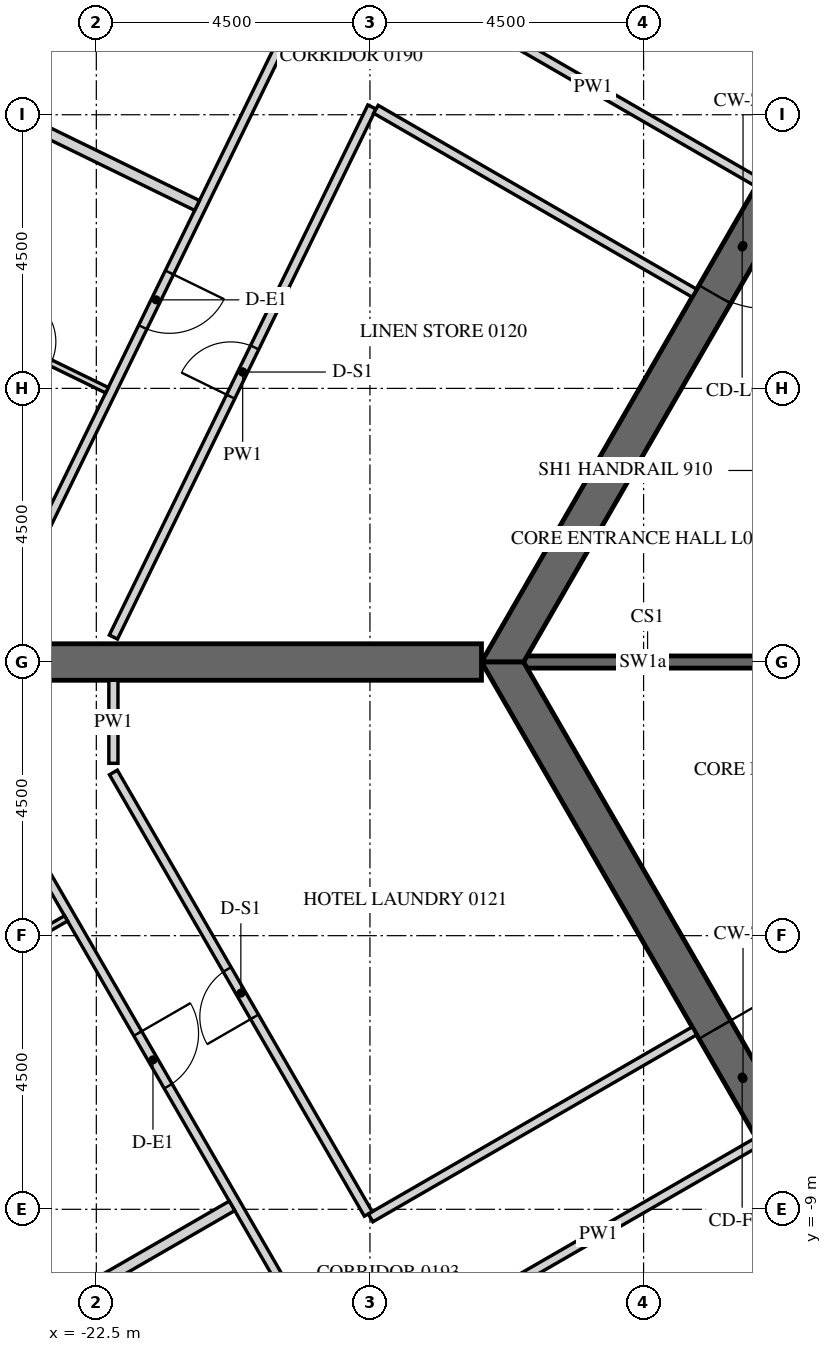
"""IFC4 building model, lengths in metres.
Left out: names, types, materials, properties, quantities, classifications, styles, units other than length and angle.
Written with IfcOpenShell. Run it as: python <this file> out.ifc"""

import sys

from ifc_helpers import new_model, si_unit, direction, frame, frame_2d, origin, place, context, subcontext, project, spatial, polyline, rectangle, outline, extrude, element, fill, save


model = new_model("IFC4")
c1 = context("Model", 3, precision=1e-05, world=origin(), true_north=direction((0.0, 1.0)))
c2 = subcontext(c1, "Body", "Model", "MODEL_VIEW")
j1 = project(units=[si_unit("LENGTHUNIT", "METRE"), si_unit("PLANEANGLEUNIT", "RADIAN")], contexts=[c1])
p1 = place(None, origin())
s1 = spatial("IfcSite", under=j1, at=p1, CompositionType="ELEMENT")
p2 = place(p1, origin())
s2 = spatial("IfcBuilding", under=s1, at=p2, CompositionType="ELEMENT")
p3 = place(p2, frame((0.0, 0.0, 37.5)))
s3 = spatial("IfcBuildingStorey", under=s2, at=p3, CompositionType="ELEMENT", Elevation=37.5)
p4 = place(p3, frame((-19.595, 27.633, -0.15), z_axis=(0.0, 0.0, 1.0), x_axis=(-0.438368285794, -0.898795441694, 0.0)))
e1 = element("IfcWall", 1, at=p4, inside=s3, PredefinedType="SOLIDWALL", context=c2, shape_type="SweptSolid", body=[
    extrude(outline(polyline([(-0.026, -0.275), (30.093, -0.275), (30.048, 0.275), (0.026, 0.275), (-0.026, -0.275)])), origin(), (0.0, 0.0, 1.0), 3.9),
])
p5 = place(p4, frame((1.236, 0.0, 1.05)))
e2 = element("IfcOpeningElement", 2, at=p5, cuts=e1, PredefinedType="OPENING", context=c2, shape_type="SweptSolid", body=[
    extrude(rectangle(XDim=2.4, YDim=2.4, at=frame_2d((1.2, 1.2))), frame((0.0, 0.285, 0.0), z_axis=(0.0, -1.0, 0.0), x_axis=(1.0, 0.0, 0.0)), (0.0, 0.0, 1.0), 0.57),
])
p6 = place(p4, frame((4.835, 0.0, 1.05)))
e3 = element("IfcOpeningElement", 3, at=p6, cuts=e1, PredefinedType="OPENING", context=c2, shape_type="SweptSolid", body=[
    extrude(rectangle(XDim=2.4, YDim=2.4, at=frame_2d((1.2, 1.2))), frame((0.0, 0.285, 0.0), z_axis=(0.0, -1.0, 0.0), x_axis=(1.0, 0.0, 0.0)), (0.0, 0.0, 1.0), 0.57),
])
p7 = place(p4, frame((8.436, 0.0, 1.05)))
e4 = element("IfcOpeningElement", 4, at=p7, cuts=e1, PredefinedType="OPENING", context=c2, shape_type="SweptSolid", body=[
    extrude(rectangle(XDim=2.4, YDim=2.4, at=frame_2d((1.2, 1.2))), frame((0.0, 0.285, 0.0), z_axis=(0.0, -1.0, 0.0), x_axis=(1.0, 0.0, 0.0)), (0.0, 0.0, 1.0), 0.57),
])
p8 = place(p4, frame((12.035, 0.0, 1.05)))
e5 = element("IfcOpeningElement", 5, at=p8, cuts=e1, PredefinedType="OPENING", context=c2, shape_type="SweptSolid", body=[
    extrude(rectangle(XDim=2.4, YDim=2.4, at=frame_2d((1.2, 1.2))), frame((0.0, 0.285, 0.0), z_axis=(0.0, -1.0, 0.0), x_axis=(1.0, 0.0, 0.0)), (0.0, 0.0, 1.0), 0.57),
])
p9 = place(p4, frame((15.635, 0.0, 1.05)))
e6 = element("IfcOpeningElement", 6, at=p9, cuts=e1, PredefinedType="OPENING", context=c2, shape_type="SweptSolid", body=[
    extrude(rectangle(XDim=2.4, YDim=2.4, at=frame_2d((1.2, 1.2))), frame((0.0, 0.285, 0.0), z_axis=(0.0, -1.0, 0.0), x_axis=(1.0, 0.0, 0.0)), (0.0, 0.0, 1.0), 0.57),
])
p10 = place(p4, frame((19.236, 0.0, 1.05)))
e7 = element("IfcOpeningElement", 7, at=p10, cuts=e1, PredefinedType="OPENING", context=c2, shape_type="SweptSolid", body=[
    extrude(rectangle(XDim=2.4, YDim=2.4, at=frame_2d((1.2, 1.2))), frame((0.0, 0.285, 0.0), z_axis=(0.0, -1.0, 0.0), x_axis=(1.0, 0.0, 0.0)), (0.0, 0.0, 1.0), 0.57),
])
p11 = place(p4, frame((22.835, 0.0, 1.05)))
e8 = element("IfcOpeningElement", 8, at=p11, cuts=e1, PredefinedType="OPENING", context=c2, shape_type="SweptSolid", body=[
    extrude(rectangle(XDim=2.4, YDim=2.4, at=frame_2d((1.2, 1.2))), frame((0.0, 0.285, 0.0), z_axis=(0.0, -1.0, 0.0), x_axis=(1.0, 0.0, 0.0)), (0.0, 0.0, 1.0), 0.57),
])
p12 = place(p4, frame((26.436, 0.0, 1.05)))
e9 = element("IfcOpeningElement", 9, at=p12, cuts=e1, PredefinedType="OPENING", context=c2, shape_type="SweptSolid", body=[
    extrude(rectangle(XDim=2.4, YDim=2.4, at=frame_2d((1.2, 1.2))), frame((0.0, 0.285, 0.0), z_axis=(0.0, -1.0, 0.0), x_axis=(1.0, 0.0, 0.0)), (0.0, 0.0, 1.0), 0.57),
])
p13 = place(p3, frame((-32.655, -2.89, -0.15), z_axis=(0.0, 0.0, 1.0), x_axis=(0.499997711317, -0.866026725152, 0.0)))
e10 = element("IfcWall", 10, at=p13, inside=s3, PredefinedType="SOLIDWALL", context=c2, shape_type="SweptSolid", body=[
    extrude(outline(polyline([(-0.022, -0.275), (30.097, -0.275), (30.045, 0.275), (0.022, 0.275), (-0.022, -0.275)])), origin(), (0.0, 0.0, 1.0), 3.9),
])
p14 = place(p13, frame((1.236, 0.0, 1.05)))
e11 = element("IfcOpeningElement", 11, at=p14, cuts=e10, PredefinedType="OPENING", context=c2, shape_type="SweptSolid", body=[
    extrude(rectangle(XDim=2.4, YDim=2.4, at=frame_2d((1.2, 1.2))), frame((0.0, 0.285, 0.0), z_axis=(0.0, -1.0, 0.0), x_axis=(1.0, 0.0, 0.0)), (0.0, 0.0, 1.0), 0.57),
])
p15 = place(p13, frame((4.835, 0.0, 1.05)))
e12 = element("IfcOpeningElement", 12, at=p15, cuts=e10, PredefinedType="OPENING", context=c2, shape_type="SweptSolid", body=[
    extrude(rectangle(XDim=2.4, YDim=2.4, at=frame_2d((1.2, 1.2))), frame((0.0, 0.285, 0.0), z_axis=(0.0, -1.0, 0.0), x_axis=(1.0, 0.0, 0.0)), (0.0, 0.0, 1.0), 0.57),
])
p16 = place(p13, frame((8.436, 0.0, 1.05)))
e13 = element("IfcOpeningElement", 13, at=p16, cuts=e10, PredefinedType="OPENING", context=c2, shape_type="SweptSolid", body=[
    extrude(rectangle(XDim=2.4, YDim=2.4, at=frame_2d((1.2, 1.2))), frame((0.0, 0.285, 0.0), z_axis=(0.0, -1.0, 0.0), x_axis=(1.0, 0.0, 0.0)), (0.0, 0.0, 1.0), 0.57),
])
p17 = place(p13, frame((12.035, 0.0, 1.05)))
e14 = element("IfcOpeningElement", 14, at=p17, cuts=e10, PredefinedType="OPENING", context=c2, shape_type="SweptSolid", body=[
    extrude(rectangle(XDim=2.4, YDim=2.4, at=frame_2d((1.2, 1.2))), frame((0.0, 0.285, 0.0), z_axis=(0.0, -1.0, 0.0), x_axis=(1.0, 0.0, 0.0)), (0.0, 0.0, 1.0), 0.57),
])
p18 = place(p13, frame((15.635, 0.0, 1.05)))
e15 = element("IfcOpeningElement", 15, at=p18, cuts=e10, PredefinedType="OPENING", context=c2, shape_type="SweptSolid", body=[
    extrude(rectangle(XDim=2.4, YDim=2.4, at=frame_2d((1.2, 1.2))), frame((0.0, 0.285, 0.0), z_axis=(0.0, -1.0, 0.0), x_axis=(1.0, 0.0, 0.0)), (0.0, 0.0, 1.0), 0.57),
])
p19 = place(p13, frame((19.236, 0.0, 1.05)))
e16 = element("IfcOpeningElement", 16, at=p19, cuts=e10, PredefinedType="OPENING", context=c2, shape_type="SweptSolid", body=[
    extrude(rectangle(XDim=2.4, YDim=2.4, at=frame_2d((1.2, 1.2))), frame((0.0, 0.285, 0.0), z_axis=(0.0, -1.0, 0.0), x_axis=(1.0, 0.0, 0.0)), (0.0, 0.0, 1.0), 0.57),
])
p20 = place(p13, frame((22.835, 0.0, 1.05)))
e17 = element("IfcOpeningElement", 17, at=p20, cuts=e10, PredefinedType="OPENING", context=c2, shape_type="SweptSolid", body=[
    extrude(rectangle(XDim=2.4, YDim=2.4, at=frame_2d((1.2, 1.2))), frame((0.0, 0.285, 0.0), z_axis=(0.0, -1.0, 0.0), x_axis=(1.0, 0.0, 0.0)), (0.0, 0.0, 1.0), 0.57),
])
p21 = place(p13, frame((26.436, 0.0, 1.05)))
e18 = element("IfcOpeningElement", 18, at=p21, cuts=e10, PredefinedType="OPENING", context=c2, shape_type="SweptSolid", body=[
    extrude(rectangle(XDim=2.4, YDim=2.4, at=frame_2d((1.2, 1.2))), frame((0.0, 0.285, 0.0), z_axis=(0.0, -1.0, 0.0), x_axis=(1.0, 0.0, 0.0)), (0.0, 0.0, 1.0), 0.57),
])
p22 = place(p3, frame((-7.91, 13.7, -0.15), z_axis=(0.0, 0.0, 1.0), x_axis=(-0.499999880136, -0.866025472988, 0.0)))
e19 = element("IfcWall", 19, at=p22, inside=s3, PredefinedType="SHEAR", context=c2, shape_type="SweptSolid", body=[
    extrude(outline(polyline([(-0.173, -0.3), (15.993, -0.3), (15.646, 0.3), (0.173, 0.3), (-0.173, -0.3)])), origin(), (0.0, 0.0, 1.0), 3.9),
])
p23 = place(p22, frame((7.039, 0.0, 0.15)))
e20 = element("IfcOpeningElement", 20, at=p23, cuts=e19, PredefinedType="OPENING", context=c2, shape_type="SweptSolid", body=[
    extrude(rectangle(XDim=1.8, YDim=2.4, at=frame_2d((0.9, 1.2))), frame((0.0, 0.31, 0.0), z_axis=(0.0, -1.0, 0.0), x_axis=(1.0, 0.0, 0.0)), (0.0, 0.0, 1.0), 0.62),
])
p24 = place(p3, frame((-15.819, 0.0, -0.15), z_axis=(0.0, 0.0, 1.0), x_axis=(0.499999880136, -0.866025472988, 0.0)))
e21 = element("IfcWall", 21, at=p24, inside=s3, PredefinedType="SHEAR", context=c2, shape_type="SweptSolid", body=[
    extrude(outline(polyline([(-0.173, -0.3), (15.993, -0.3), (15.646, 0.3), (0.173, 0.3), (-0.173, -0.3)])), origin(), (0.0, 0.0, 1.0), 3.9),
])
p25 = place(p24, frame((6.981, 0.0, 0.15)))
e22 = element("IfcOpeningElement", 22, at=p25, cuts=e21, PredefinedType="OPENING", context=c2, shape_type="SweptSolid", body=[
    extrude(rectangle(XDim=1.8, YDim=2.4, at=frame_2d((0.9, 1.2))), frame((0.0, 0.31, 0.0), z_axis=(0.0, -1.0, 0.0), x_axis=(1.0, 0.0, 0.0)), (0.0, 0.0, 1.0), 0.62),
])
p26 = place(p3, frame((-16.166, 0.0, -0.15), z_axis=(0.0, 0.0, 1.0), x_axis=(-1.0, 0.0, 0.0)))
e23 = element("IfcWall", 23, at=p26, inside=s3, PredefinedType="SHEAR", context=c2, shape_type="SweptSolid", body=[
    extrude(rectangle(XDim=16.509, YDim=0.6, at=frame_2d((8.254, 0.0))), origin(), (0.0, 0.0, 1.0), 3.9),
])
p27 = place(p26, frame((7.354, 0.0, 0.15)))
e24 = element("IfcOpeningElement", 24, at=p27, cuts=e23, PredefinedType="OPENING", context=c2, shape_type="SweptSolid", body=[
    extrude(rectangle(XDim=1.8, YDim=2.4, at=frame_2d((0.9, 1.2))), frame((0.0, 0.31, 0.0), z_axis=(0.0, -1.0, 0.0), x_axis=(1.0, 0.0, 0.0)), (0.0, 0.0, 1.0), 0.62),
])
p28 = place(p3, frame((-11.547, 0.0, -0.15), z_axis=(0.0, 0.0, 1.0), x_axis=(-1.0, 0.0, 0.0)))
e25 = element("IfcWall", 25, at=p28, inside=s3, PredefinedType="SHEAR", context=c2, shape_type="SweptSolid", body=[
    extrude(rectangle(XDim=3.926, YDim=0.2, at=frame_2d((1.963, 0.0))), origin(), (0.0, 0.0, 1.0), 3.9),
])
p29 = place(p3, frame((-13.752, 21.875, 0.0), z_axis=(0.0, 0.0, 1.0), x_axis=(-0.438374473378, -0.898792423806, 0.0)))
e26 = element("IfcWall", 26, at=p29, inside=s3, PredefinedType="PARTITIONING", context=c2, shape_type="SweptSolid", body=[
    extrude(rectangle(XDim=21.918, YDim=0.15, at=frame_2d((10.959, 0.0))), origin(), (0.0, 0.0, 1.0), 2.988),
])
p30 = place(p29, frame((9.521, 0.0, 0.0)))
e27 = element("IfcOpeningElement", 27, at=p30, cuts=e26, PredefinedType="OPENING", context=c2, shape_type="SweptSolid", body=[
    extrude(rectangle(XDim=1.0, YDim=2.1, at=frame_2d((0.5, 1.05))), frame((0.0, 0.085, 0.0), z_axis=(0.0, -1.0, 0.0), x_axis=(1.0, 0.0, 0.0)), (0.0, 0.0, 1.0), 0.17),
])
p31 = place(p29, frame((17.211, 0.0, 0.0)))
e28 = element("IfcOpeningElement", 28, at=p31, cuts=e26, PredefinedType="OPENING", context=c2, shape_type="SweptSolid", body=[
    extrude(rectangle(XDim=1.0, YDim=2.1, at=frame_2d((0.5, 1.05))), frame((0.0, 0.085, 0.0), z_axis=(0.0, -1.0, 0.0), x_axis=(1.0, 0.0, 0.0)), (0.0, 0.0, 1.0), 0.17),
])
p32 = place(p3, frame((-11.614, 7.884, 0.0), z_axis=(0.0, 0.0, 1.0), x_axis=(-0.866025438137, 0.4999999405, 0.0)))
e29 = element("IfcWall", 29, at=p32, inside=s3, PredefinedType="PARTITIONING", context=c2, shape_type="SweptSolid", body=[
    extrude(rectangle(XDim=6.271, YDim=0.15, at=frame_2d((3.135, 0.0))), origin(), (0.0, 0.0, 1.0), 2.988),
])
p33 = place(p3, frame((-22.219, 0.41, 0.0), z_axis=(0.0, 0.0, 1.0), x_axis=(0.438391891827, 0.898783927972, 0.0)))
e30 = element("IfcWall", 30, at=p33, inside=s3, PredefinedType="PARTITIONING", context=c2, shape_type="SweptSolid", body=[
    extrude(rectangle(XDim=9.699, YDim=0.15, at=frame_2d((4.85, 0.0))), origin(), (0.0, 0.0, 1.0), 2.988),
])
p34 = place(p33, frame((4.4, 0.0, 0.0)))
e31 = element("IfcOpeningElement", 31, at=p34, cuts=e30, PredefinedType="OPENING", context=c2, shape_type="SweptSolid", body=[
    extrude(rectangle(XDim=0.9, YDim=2.1, at=frame_2d((0.45, 1.05))), frame((0.0, 0.085, 0.0), z_axis=(0.0, -1.0, 0.0), x_axis=(1.0, 0.0, 0.0)), (0.0, 0.0, 1.0), 0.17),
])
p35 = place(p3, frame((-17.902, 9.09, 0.0), z_axis=(0.0, 0.0, 1.0), x_axis=(0.866036368755, -0.499981007633, 0.0)))
e32 = element("IfcWall", 32, at=p35, inside=s3, PredefinedType="PARTITIONING", context=c2, shape_type="SweptSolid", body=[
    extrude(rectangle(XDim=6.049, YDim=0.15, at=frame_2d((3.024, 0.0))), origin(), (0.0, 0.0, 1.0), 2.988),
])
p36 = place(p3, frame((-24.09, -2.175, 0.0), z_axis=(0.0, 0.0, 1.0), x_axis=(0.499996832073, -0.86602723278, 0.0)))
e33 = element("IfcWall", 33, at=p36, inside=s3, PredefinedType="PARTITIONING", context=c2, shape_type="SweptSolid", body=[
    extrude(rectangle(XDim=23.877, YDim=0.15, at=frame_2d((11.938, 0.0))), origin(), (0.0, 0.0, 1.0), 2.988),
])
p37 = place(p36, frame((4.543, 0.0, 0.0)))
e34 = element("IfcOpeningElement", 34, at=p37, cuts=e33, PredefinedType="OPENING", context=c2, shape_type="SweptSolid", body=[
    extrude(rectangle(XDim=1.0, YDim=2.1, at=frame_2d((0.5, 1.05))), frame((0.0, 0.085, 0.0), z_axis=(0.0, -1.0, 0.0), x_axis=(1.0, 0.0, 0.0)), (0.0, 0.0, 1.0), 0.17),
])
p38 = place(p36, frame((11.372, 0.0, 0.0)))
e35 = element("IfcOpeningElement", 35, at=p38, cuts=e33, PredefinedType="OPENING", context=c2, shape_type="SweptSolid", body=[
    extrude(rectangle(XDim=1.0, YDim=2.1, at=frame_2d((0.5, 1.05))), frame((0.0, 0.085, 0.0), z_axis=(0.0, -1.0, 0.0), x_axis=(1.0, 0.0, 0.0)), (0.0, 0.0, 1.0), 0.17),
])
p39 = place(p36, frame((19.425, 0.0, 0.0)))
e36 = element("IfcOpeningElement", 36, at=p39, cuts=e33, PredefinedType="OPENING", context=c2, shape_type="SweptSolid", body=[
    extrude(rectangle(XDim=1.0, YDim=2.1, at=frame_2d((0.5, 1.05))), frame((0.0, 0.085, 0.0), z_axis=(0.0, -1.0, 0.0), x_axis=(1.0, 0.0, 0.0)), (0.0, 0.0, 1.0), 0.17),
])
p40 = place(p3, frame((-12.664, -6.066, 0.0), z_axis=(0.0, 0.0, 1.0), x_axis=(-0.866023618125, -0.500003092839, 0.0)))
e37 = element("IfcWall", 37, at=p40, inside=s3, PredefinedType="PARTITIONING", context=c2, shape_type="SweptSolid", body=[
    extrude(rectangle(XDim=6.15, YDim=0.15, at=frame_2d((3.075, 0.0))), origin(), (0.0, 0.0, 1.0), 2.988),
])
p41 = place(p3, frame((-18.027, -9.076, 0.0), z_axis=(0.0, 0.0, 1.0), x_axis=(-0.500007318041, 0.86602117867, 0.0)))
e38 = element("IfcWall", 38, at=p41, inside=s3, PredefinedType="PARTITIONING", context=c2, shape_type="SweptSolid", body=[
    extrude(rectangle(XDim=8.383, YDim=0.15, at=frame_2d((4.191, 0.0))), origin(), (0.0, 0.0, 1.0), 2.988),
])
p42 = place(p41, frame((3.742, 0.0, 0.0)))
e39 = element("IfcOpeningElement", 39, at=p42, cuts=e38, PredefinedType="OPENING", context=c2, shape_type="SweptSolid", body=[
    extrude(rectangle(XDim=0.9, YDim=2.1, at=frame_2d((0.45, 1.05))), frame((0.0, 0.085, 0.0), z_axis=(0.0, -1.0, 0.0), x_axis=(1.0, 0.0, 0.0)), (0.0, 0.0, 1.0), 0.17),
])
p43 = place(p3, frame((-22.219, -1.666, 0.0), z_axis=(0.0, 0.0, 1.0), x_axis=(0.0, 1.0, 0.0)))
e40 = element("IfcWall", 40, at=p43, inside=s3, PredefinedType="PARTITIONING", context=c2, shape_type="SweptSolid", body=[
    extrude(rectangle(XDim=1.366, YDim=0.15, at=frame_2d((0.683, 0.0))), origin(), (0.0, 0.0, 1.0), 2.988),
])
p44 = place(p3, frame((-16.875, -10.922, 0.0), z_axis=(0.0, 0.0, 1.0), x_axis=(0.866023634079, 0.500003065207, 0.0)))
e41 = element("IfcWall", 41, at=p44, inside=s3, PredefinedType="PARTITIONING", context=c2, shape_type="SweptSolid", body=[
    extrude(rectangle(XDim=6.075, YDim=0.15, at=frame_2d((3.038, 0.0))), origin(), (0.0, 0.0, 1.0), 2.988),
])
p45 = place(p3, frame((-21.416, 15.743, 0.0), z_axis=(0.0, 0.0, 1.0), x_axis=(-0.438380708798, -0.898789382533, 0.0)))
e42 = element("IfcWall", 42, at=p45, inside=s3, PredefinedType="PARTITIONING", context=c2, shape_type="SweptSolid", body=[
    extrude(rectangle(XDim=7.06, YDim=0.1, at=frame_2d((3.53, 0.0))), origin(), (0.0, 0.0, 1.0), 2.988),
])
p46 = place(p45, frame((3.1, 0.0, 0.0)))
e43 = element("IfcOpeningElement", 43, at=p46, cuts=e42, PredefinedType="OPENING", context=c2, shape_type="SweptSolid", body=[
    extrude(rectangle(XDim=0.9, YDim=2.1, at=frame_2d((0.45, 1.05))), frame((0.0, 0.06, 0.0), z_axis=(0.0, -1.0, 0.0), x_axis=(1.0, 0.0, 0.0)), (0.0, 0.0, 1.0), 0.12),
])
p47 = place(p3, frame((-27.517, 10.763, 0.0), z_axis=(0.0, 0.0, 1.0), x_axis=(0.898789933843, -0.438379578473, 0.0)))
e44 = element("IfcWall", 44, at=p47, inside=s3, PredefinedType="PARTITIONING", context=c2, shape_type="SweptSolid", body=[
    extrude(rectangle(XDim=7.425, YDim=0.18, at=frame_2d((3.712, 0.0))), origin(), (0.0, 0.0, 1.0), 2.988),
])
p48 = place(p3, frame((-24.909, 5.73, 0.0), z_axis=(0.0, 0.0, 1.0), x_axis=(0.898799457159, -0.438360052708, 0.0)))
e45 = element("IfcWall", 45, at=p48, inside=s3, PredefinedType="PARTITIONING", context=c2, shape_type="SweptSolid", body=[
    extrude(rectangle(XDim=2.875, YDim=0.1, at=frame_2d((1.438, 0.0))), origin(), (0.0, 0.0, 1.0), 2.988),
])
p49 = place(p48, frame((1.05, 0.0, 0.0)))
e46 = element("IfcOpeningElement", 46, at=p49, cuts=e45, PredefinedType="OPENING", context=c2, shape_type="SweptSolid", body=[
    extrude(rectangle(XDim=0.8, YDim=2.1, at=frame_2d((0.4, 1.05))), frame((0.0, 0.06, 0.0), z_axis=(0.0, -1.0, 0.0), x_axis=(1.0, 0.0, 0.0)), (0.0, 0.0, 1.0), 0.12),
])
p50 = place(p3, frame((-22.998, -4.216, 0.0), z_axis=(0.0, 0.0, 1.0), x_axis=(-0.866025730634, -0.499999433879, 0.0)))
e47 = element("IfcWall", 47, at=p50, inside=s3, PredefinedType="PARTITIONING", context=c2, shape_type="SweptSolid", body=[
    extrude(rectangle(XDim=2.925, YDim=0.1, at=frame_2d((1.462, 0.0))), origin(), (0.0, 0.0, 1.0), 2.988),
])
p51 = place(p50, frame((1.025, 0.0, 0.0)))
e48 = element("IfcOpeningElement", 48, at=p51, cuts=e47, PredefinedType="OPENING", context=c2, shape_type="SweptSolid", body=[
    extrude(rectangle(XDim=0.8, YDim=2.1, at=frame_2d((0.4, 1.05))), frame((0.0, 0.06, 0.0), z_axis=(0.0, -1.0, 0.0), x_axis=(1.0, 0.0, 0.0)), (0.0, 0.0, 1.0), 0.12),
])
p52 = place(p3, frame((-26.699, -12.656, 0.0), z_axis=(0.0, 0.0, 1.0), x_axis=(0.866028983062, 0.499993800457, 0.0)))
e49 = element("IfcWall", 49, at=p52, inside=s3, PredefinedType="PARTITIONING", context=c2, shape_type="SweptSolid", body=[
    extrude(rectangle(XDim=7.425, YDim=0.18, at=frame_2d((3.712, 0.0))), origin(), (0.0, 0.0, 1.0), 2.988),
])
p53 = place(p23, origin())
e50 = element("IfcDoor", 50, at=p53, inside=s3, OperationType="DOUBLE_DOOR_SINGLE_SWING", PredefinedType="DOOR", context=c2, shape_type="SweptSolid", body=[
    extrude(rectangle(XDim=1.8, YDim=2.4, at=frame_2d((0.9, 1.2))), frame((0.0, 0.025, 0.0), z_axis=(0.0, -1.0, 0.0), x_axis=(1.0, 0.0, 0.0)), (0.0, 0.0, 1.0), 0.05),
])
fill(e20, e50)
p54 = place(p25, origin())
e51 = element("IfcDoor", 51, at=p54, inside=s3, OperationType="DOUBLE_DOOR_SINGLE_SWING", PredefinedType="DOOR", context=c2, shape_type="SweptSolid", body=[
    extrude(rectangle(XDim=1.8, YDim=2.4, at=frame_2d((0.9, 1.2))), frame((0.0, 0.025, 0.0), z_axis=(0.0, -1.0, 0.0), x_axis=(1.0, 0.0, 0.0)), (0.0, 0.0, 1.0), 0.05),
])
fill(e22, e51)
p55 = place(p31, origin())
e52 = element("IfcDoor", 52, at=p55, inside=s3, OperationType="SINGLE_SWING_LEFT", PredefinedType="DOOR", context=c2, shape_type="SweptSolid", body=[
    extrude(rectangle(XDim=1.0, YDim=2.1, at=frame_2d((0.5, 1.05))), frame((0.0, 0.025, 0.0), z_axis=(0.0, -1.0, 0.0), x_axis=(1.0, 0.0, 0.0)), (0.0, 0.0, 1.0), 0.05),
])
fill(e28, e52)
p56 = place(p37, origin())
e53 = element("IfcDoor", 53, at=p56, inside=s3, OperationType="SINGLE_SWING_RIGHT", PredefinedType="DOOR", context=c2, shape_type="SweptSolid", body=[
    extrude(rectangle(XDim=1.0, YDim=2.1, at=frame_2d((0.5, 1.05))), frame((0.0, 0.025, 0.0), z_axis=(0.0, -1.0, 0.0), x_axis=(1.0, 0.0, 0.0)), (0.0, 0.0, 1.0), 0.05),
])
fill(e34, e53)
p57 = place(p34, origin())
e54 = element("IfcDoor", 54, at=p57, inside=s3, OperationType="SINGLE_SWING_LEFT", PredefinedType="DOOR", context=c2, shape_type="SweptSolid", body=[
    extrude(rectangle(XDim=0.9, YDim=2.1, at=frame_2d((0.45, 1.05))), frame((0.0, 0.025, 0.0), z_axis=(0.0, -1.0, 0.0), x_axis=(1.0, 0.0, 0.0)), (0.0, 0.0, 1.0), 0.05),
])
fill(e31, e54)
p58 = place(p42, origin())
e55 = element("IfcDoor", 55, at=p58, inside=s3, OperationType="SINGLE_SWING_RIGHT", PredefinedType="DOOR", context=c2, shape_type="SweptSolid", body=[
    extrude(rectangle(XDim=0.9, YDim=2.1, at=frame_2d((0.45, 1.05))), frame((0.0, 0.025, 0.0), z_axis=(0.0, -1.0, 0.0), x_axis=(1.0, 0.0, 0.0)), (0.0, 0.0, 1.0), 0.05),
])
fill(e39, e55)
save(model, sys.argv[1])
